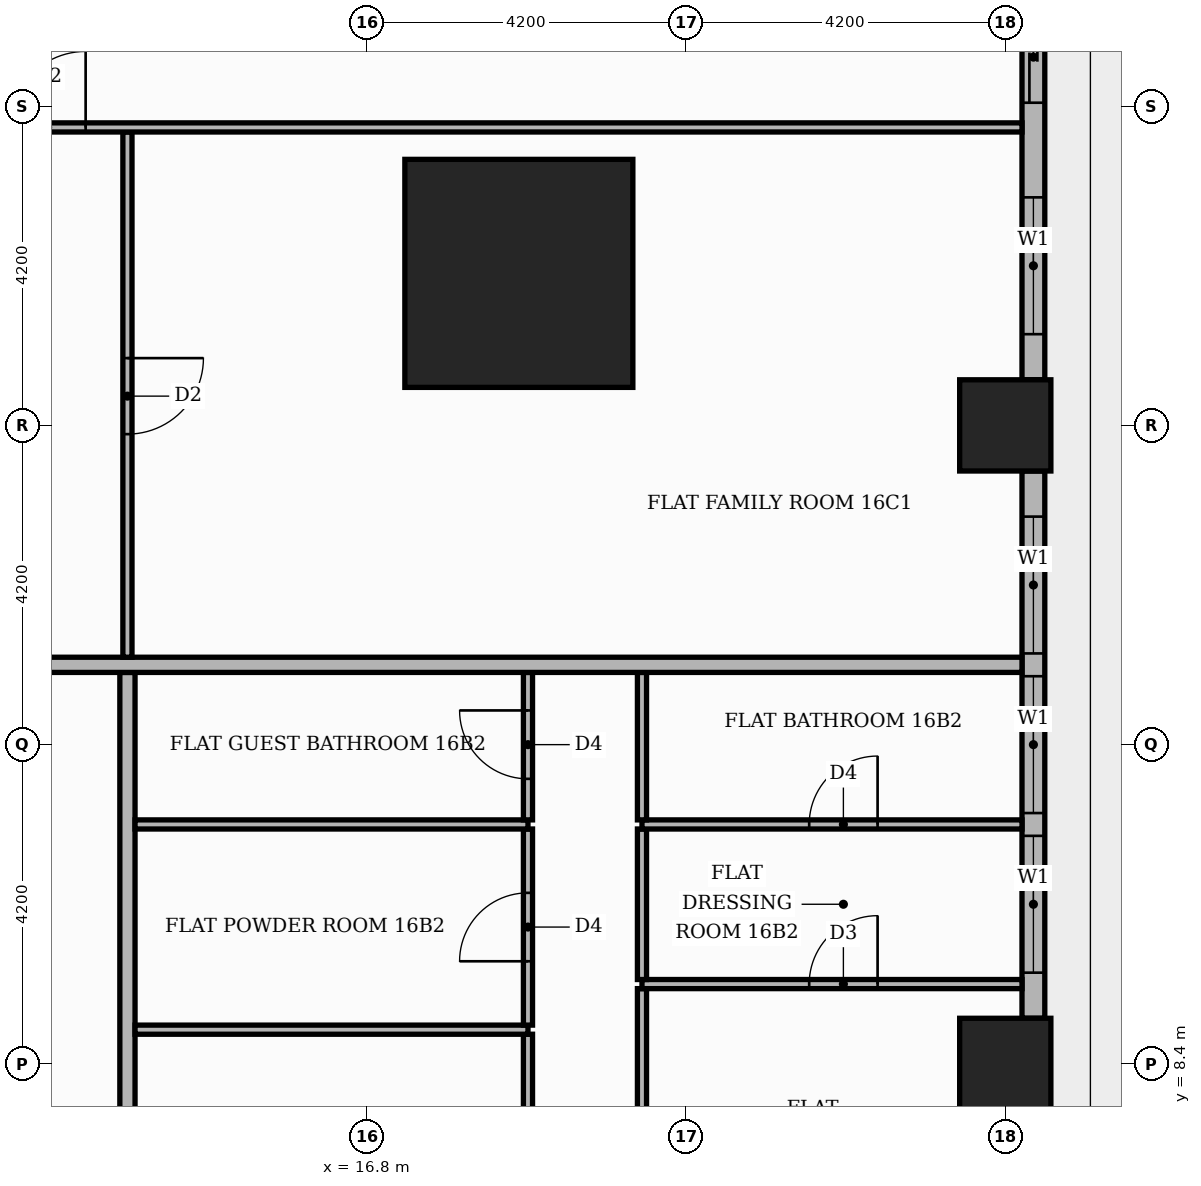
"""IFC4 building model, lengths in metres.
Left out: names, types, materials, properties, quantities, classifications, styles, units other than length and angle.
Written with IfcOpenShell. Run it as: python <this file> out.ifc"""

import sys

from ifc_helpers import new_model, si_unit, direction, frame, frame_2d, origin, origin_2d, place, context, subcontext, project, spatial, rectangle, extrude, element, fill, save


model = new_model("IFC4")
c1 = context("Model", 3, precision=1e-05, world=origin(), true_north=direction((0.0, 1.0)))
c2 = subcontext(c1, "Body", "Model", "MODEL_VIEW")
j1 = project(units=[si_unit("LENGTHUNIT", "METRE"), si_unit("PLANEANGLEUNIT", "RADIAN")], contexts=[c1])
p1 = place(None, origin())
s1 = spatial("IfcSite", under=j1, at=p1, CompositionType="ELEMENT")
p2 = place(p1, origin())
s2 = spatial("IfcBuilding", under=s1, at=p2, CompositionType="ELEMENT")
p3 = place(p2, frame((0.0, 0.0, 69.9)))
s3 = spatial("IfcBuildingStorey", under=s2, at=p3, CompositionType="ELEMENT", Elevation=69.9)
p4 = place(p3, frame((18.8, 18.8, 0.0), z_axis=(0.0, 0.0, 1.0), x_axis=(1.0, 0.0, 0.0)))
e1 = element("IfcColumn", 1, at=p4, inside=s3, PredefinedType="COLUMN", context=c2, shape_type="SweptSolid", body=[
    extrude(rectangle(XDim=3.0, YDim=3.0, at=origin_2d()), origin(), (0.0, 0.0, 1.0), 3.9),
])
for number, where, z_axis, x_axis in (
    (2, (25.2, 8.4, 0.0), (0.0, 0.0, 1.0), (1.0, 0.0, 0.0)),
    (3, (25.2, 16.8, 0.0), (0.0, 0.0, 1.0), (1.0, 0.0, 0.0)),
):
    element("IfcColumn", number, at=place(p3, frame(where, z_axis=z_axis, x_axis=x_axis)), inside=s3, PredefinedType="COLUMN", context=c2, shape_type="SweptSolid", body=[
        extrude(rectangle(XDim=1.2, YDim=1.2, at=origin_2d()), origin(), (0.0, 0.0, 1.0), 3.9),
    ])
p5 = place(p3, frame((25.57, 9.0, 0.0), z_axis=(0.0, 0.0, 1.0), x_axis=(0.0, 1.0, 0.0)))
e4 = element("IfcWall", 4, at=p5, inside=s3, PredefinedType="STANDARD", context=c2, shape_type="SweptSolid", body=[
    extrude(rectangle(XDim=7.2, YDim=0.3, at=frame_2d((3.6, 0.0))), origin(), (0.0, 0.0, 1.0), 3.4),
])
p6 = place(p5, frame((0.6, 0.0, 0.9)))
e5 = element("IfcOpeningElement", 5, at=p6, cuts=e4, PredefinedType="OPENING", context=c2, shape_type="SweptSolid", body=[
    extrude(rectangle(XDim=1.8, YDim=2.1, at=frame_2d((0.9, 1.05))), frame((0.0, 0.16, 0.0), z_axis=(0.0, -1.0, 0.0), x_axis=(1.0, 0.0, 0.0)), (0.0, 0.0, 1.0), 0.32),
])
p7 = place(p5, frame((2.7, 0.0, 0.9)))
e6 = element("IfcOpeningElement", 6, at=p7, cuts=e4, PredefinedType="OPENING", context=c2, shape_type="SweptSolid", body=[
    extrude(rectangle(XDim=1.8, YDim=2.1, at=frame_2d((0.9, 1.05))), frame((0.0, 0.16, 0.0), z_axis=(0.0, -1.0, 0.0), x_axis=(1.0, 0.0, 0.0)), (0.0, 0.0, 1.0), 0.32),
])
p8 = place(p5, frame((4.8, 0.0, 0.9)))
e7 = element("IfcOpeningElement", 7, at=p8, cuts=e4, PredefinedType="OPENING", context=c2, shape_type="SweptSolid", body=[
    extrude(rectangle(XDim=1.8, YDim=2.1, at=frame_2d((0.9, 1.05))), frame((0.0, 0.16, 0.0), z_axis=(0.0, -1.0, 0.0), x_axis=(1.0, 0.0, 0.0)), (0.0, 0.0, 1.0), 0.32),
])
p9 = place(p3, frame((25.57, 17.4, 0.0), z_axis=(0.0, 0.0, 1.0), x_axis=(0.0, 1.0, 0.0)))
e8 = element("IfcWall", 8, at=p9, inside=s3, PredefinedType="STANDARD", context=c2, shape_type="SweptSolid", body=[
    extrude(rectangle(XDim=5.32, YDim=0.3, at=frame_2d((2.66, 0.0))), origin(), (0.0, 0.0, 1.0), 3.4),
])
p10 = place(p9, frame((0.6, 0.0, 0.9)))
e9 = element("IfcOpeningElement", 9, at=p10, cuts=e8, PredefinedType="OPENING", context=c2, shape_type="SweptSolid", body=[
    extrude(rectangle(XDim=1.8, YDim=2.1, at=frame_2d((0.9, 1.05))), frame((0.0, 0.16, 0.0), z_axis=(0.0, -1.0, 0.0), x_axis=(1.0, 0.0, 0.0)), (0.0, 0.0, 1.0), 0.32),
])
p11 = place(p9, frame((3.645, 0.0, 0.0)))
e10 = element("IfcOpeningElement", 10, at=p11, cuts=e8, PredefinedType="OPENING", context=c2, shape_type="SweptSolid", body=[
    extrude(rectangle(XDim=1.2, YDim=2.4, at=frame_2d((0.6, 1.2))), frame((0.0, 0.16, 0.0), z_axis=(0.0, -1.0, 0.0), x_axis=(1.0, 0.0, 0.0)), (0.0, 0.0, 1.0), 0.32),
])
p12 = place(p3, frame((13.65, -5.15, 0.0), z_axis=(0.0, 0.0, 1.0), x_axis=(0.0, 1.0, 0.0)))
e11 = element("IfcWall", 11, at=p12, inside=s3, PredefinedType="PARTITIONING", context=c2, shape_type="SweptSolid", body=[
    extrude(rectangle(XDim=18.7, YDim=0.2, at=frame_2d((9.35, 0.0))), origin(), (0.0, 0.0, 1.0), 3.4),
])
p13 = place(p12, frame((5.65, 0.0, 0.0)))
e12 = element("IfcOpeningElement", 12, at=p13, cuts=e11, PredefinedType="OPENING", context=c2, shape_type="SweptSolid", body=[
    extrude(rectangle(XDim=1.1, YDim=2.4, at=frame_2d((0.55, 1.2))), frame((0.0, 0.11, 0.0), z_axis=(0.0, -1.0, 0.0), x_axis=(1.0, 0.0, 0.0)), (0.0, 0.0, 1.0), 0.22),
])
p14 = place(p3, frame((18.92, 3.21, 0.0), z_axis=(0.0, 0.0, 1.0), x_axis=(0.0, 1.0, 0.0)))
e13 = element("IfcWall", 13, at=p14, inside=s3, PredefinedType="PARTITIONING", context=c2, shape_type="SweptSolid", body=[
    extrude(rectangle(XDim=5.58, YDim=0.12, at=frame_2d((2.79, 0.0))), origin(), (0.0, 0.0, 1.0), 3.4),
])
p15 = place(p14, frame((2.34, 0.0, 0.0)))
e14 = element("IfcOpeningElement", 14, at=p15, cuts=e13, PredefinedType="OPENING", context=c2, shape_type="SweptSolid", body=[
    extrude(rectangle(XDim=0.9, YDim=2.1, at=frame_2d((0.45, 1.05))), frame((0.0, 0.07, 0.0), z_axis=(0.0, -1.0, 0.0), x_axis=(1.0, 0.0, 0.0)), (0.0, 0.0, 1.0), 0.14),
])
p16 = place(p3, frame((20.42, 5.31, 0.0), z_axis=(0.0, 0.0, 1.0), x_axis=(0.0, 1.0, 0.0)))
e15 = element("IfcWall", 15, at=p16, inside=s3, PredefinedType="PARTITIONING", context=c2, shape_type="SweptSolid", body=[
    extrude(rectangle(XDim=4.08, YDim=0.12, at=frame_2d((2.04, 0.0))), origin(), (0.0, 0.0, 1.0), 3.4),
])
p17 = place(p16, frame((1.59, 0.0, 0.0)))
e16 = element("IfcOpeningElement", 16, at=p17, cuts=e15, PredefinedType="OPENING", context=c2, shape_type="SweptSolid", body=[
    extrude(rectangle(XDim=0.9, YDim=2.1, at=frame_2d((0.45, 1.05))), frame((0.0, 0.07, 0.0), z_axis=(0.0, -1.0, 0.0), x_axis=(1.0, 0.0, 0.0)), (0.0, 0.0, 1.0), 0.14),
])
p18 = place(p3, frame((13.75, 8.85, 0.0), z_axis=(0.0, 0.0, 1.0), x_axis=(1.0, 0.0, 0.0)))
e17 = element("IfcWall", 17, at=p18, inside=s3, PredefinedType="PARTITIONING", context=c2, shape_type="SweptSolid", body=[
    extrude(rectangle(XDim=5.17, YDim=0.12, at=frame_2d((2.585, 0.0))), origin(), (0.0, 0.0, 1.0), 3.4),
])
p19 = place(p3, frame((18.92, 8.91, 0.0), z_axis=(0.0, 0.0, 1.0), x_axis=(0.0, 1.0, 0.0)))
e18 = element("IfcWall", 18, at=p19, inside=s3, PredefinedType="PARTITIONING", context=c2, shape_type="SweptSolid", body=[
    extrude(rectangle(XDim=2.58, YDim=0.12, at=frame_2d((1.29, 0.0))), origin(), (0.0, 0.0, 1.0), 3.4),
])
p20 = place(p19, frame((0.84, 0.0, 0.0)))
e19 = element("IfcOpeningElement", 19, at=p20, cuts=e18, PredefinedType="OPENING", context=c2, shape_type="SweptSolid", body=[
    extrude(rectangle(XDim=0.9, YDim=2.1, at=frame_2d((0.45, 1.05))), frame((0.0, 0.07, 0.0), z_axis=(0.0, -1.0, 0.0), x_axis=(1.0, 0.0, 0.0)), (0.0, 0.0, 1.0), 0.14),
])
p21 = place(p3, frame((20.42, 9.45, 0.0), z_axis=(0.0, 0.0, 1.0), x_axis=(1.0, 0.0, 0.0)))
e20 = element("IfcWall", 20, at=p21, inside=s3, PredefinedType="PARTITIONING", context=c2, shape_type="SweptSolid", body=[
    extrude(rectangle(XDim=5.0, YDim=0.12, at=frame_2d((2.5, 0.0))), origin(), (0.0, 0.0, 1.0), 3.4),
])
p22 = place(p21, frame((2.2, 0.0, 0.0)))
e21 = element("IfcOpeningElement", 21, at=p22, cuts=e20, PredefinedType="OPENING", context=c2, shape_type="SweptSolid", body=[
    extrude(rectangle(XDim=0.9, YDim=2.1, at=frame_2d((0.45, 1.05))), frame((0.0, 0.07, 0.0), z_axis=(0.0, -1.0, 0.0), x_axis=(1.0, 0.0, 0.0)), (0.0, 0.0, 1.0), 0.14),
])
p23 = place(p3, frame((20.42, 9.51, 0.0), z_axis=(0.0, 0.0, 1.0), x_axis=(0.0, 1.0, 0.0)))
e22 = element("IfcWall", 22, at=p23, inside=s3, PredefinedType="PARTITIONING", context=c2, shape_type="SweptSolid", body=[
    extrude(rectangle(XDim=1.98, YDim=0.12, at=frame_2d((0.99, 0.0))), origin(), (0.0, 0.0, 1.0), 3.4),
])
p24 = place(p3, frame((13.75, 11.55, 0.0), z_axis=(0.0, 0.0, 1.0), x_axis=(1.0, 0.0, 0.0)))
e23 = element("IfcWall", 23, at=p24, inside=s3, PredefinedType="PARTITIONING", context=c2, shape_type="SweptSolid", body=[
    extrude(rectangle(XDim=5.17, YDim=0.12, at=frame_2d((2.585, 0.0))), origin(), (0.0, 0.0, 1.0), 3.4),
])
p25 = place(p3, frame((20.42, 11.55, 0.0), z_axis=(0.0, 0.0, 1.0), x_axis=(1.0, 0.0, 0.0)))
e24 = element("IfcWall", 24, at=p25, inside=s3, PredefinedType="PARTITIONING", context=c2, shape_type="SweptSolid", body=[
    extrude(rectangle(XDim=5.0, YDim=0.12, at=frame_2d((2.5, 0.0))), origin(), (0.0, 0.0, 1.0), 3.4),
])
p26 = place(p25, frame((2.2, 0.0, 0.0)))
e25 = element("IfcOpeningElement", 25, at=p26, cuts=e24, PredefinedType="OPENING", context=c2, shape_type="SweptSolid", body=[
    extrude(rectangle(XDim=0.9, YDim=2.1, at=frame_2d((0.45, 1.05))), frame((0.0, 0.07, 0.0), z_axis=(0.0, -1.0, 0.0), x_axis=(1.0, 0.0, 0.0)), (0.0, 0.0, 1.0), 0.14),
])
p27 = place(p3, frame((18.92, 11.61, 0.0), z_axis=(0.0, 0.0, 1.0), x_axis=(0.0, 1.0, 0.0)))
e26 = element("IfcWall", 26, at=p27, inside=s3, PredefinedType="PARTITIONING", context=c2, shape_type="SweptSolid", body=[
    extrude(rectangle(XDim=1.94, YDim=0.12, at=frame_2d((0.97, 0.0))), origin(), (0.0, 0.0, 1.0), 3.4),
])
p28 = place(p27, frame((0.54, 0.0, 0.0)))
e27 = element("IfcOpeningElement", 27, at=p28, cuts=e26, PredefinedType="OPENING", context=c2, shape_type="SweptSolid", body=[
    extrude(rectangle(XDim=0.9, YDim=2.1, at=frame_2d((0.45, 1.05))), frame((0.0, 0.07, 0.0), z_axis=(0.0, -1.0, 0.0), x_axis=(1.0, 0.0, 0.0)), (0.0, 0.0, 1.0), 0.14),
])
p29 = place(p3, frame((20.42, 11.61, 0.0), z_axis=(0.0, 0.0, 1.0), x_axis=(0.0, 1.0, 0.0)))
e28 = element("IfcWall", 28, at=p29, inside=s3, PredefinedType="PARTITIONING", context=c2, shape_type="SweptSolid", body=[
    extrude(rectangle(XDim=1.94, YDim=0.12, at=frame_2d((0.97, 0.0))), origin(), (0.0, 0.0, 1.0), 3.4),
])
p30 = place(p3, frame((-13.65, 13.65, 0.0), z_axis=(0.0, 0.0, 1.0), x_axis=(1.0, 0.0, 0.0)))
e29 = element("IfcWall", 29, at=p30, inside=s3, PredefinedType="PARTITIONING", context=c2, shape_type="SweptSolid", body=[
    extrude(rectangle(XDim=39.07, YDim=0.2, at=frame_2d((19.535, 0.0))), origin(), (0.0, 0.0, 1.0), 3.4),
])
p31 = place(p30, frame((23.6, 0.0, 0.0)))
e30 = element("IfcOpeningElement", 30, at=p31, cuts=e29, PredefinedType="OPENING", context=c2, shape_type="SweptSolid", body=[
    extrude(rectangle(XDim=1.1, YDim=2.4, at=frame_2d((0.55, 1.2))), frame((0.0, 0.11, 0.0), z_axis=(0.0, -1.0, 0.0), x_axis=(1.0, 0.0, 0.0)), (0.0, 0.0, 1.0), 0.22),
])
p32 = place(p3, frame((13.65, 13.75, 0.0), z_axis=(0.0, 0.0, 1.0), x_axis=(0.0, 1.0, 0.0)))
e31 = element("IfcWall", 31, at=p32, inside=s3, PredefinedType="PARTITIONING", context=c2, shape_type="SweptSolid", body=[
    extrude(rectangle(XDim=6.91, YDim=0.12, at=frame_2d((3.455, 0.0))), origin(), (0.0, 0.0, 1.0), 3.4),
])
p33 = place(p32, frame((2.935, 0.0, 0.0)))
e32 = element("IfcOpeningElement", 32, at=p33, cuts=e31, PredefinedType="OPENING", context=c2, shape_type="SweptSolid", body=[
    extrude(rectangle(XDim=1.0, YDim=2.1, at=frame_2d((0.5, 1.05))), frame((0.0, 0.07, 0.0), z_axis=(0.0, -1.0, 0.0), x_axis=(1.0, 0.0, 0.0)), (0.0, 0.0, 1.0), 0.14),
])
p34 = place(p3, frame((-13.55, 20.72, 0.0), z_axis=(0.0, 0.0, 1.0), x_axis=(1.0, 0.0, 0.0)))
e33 = element("IfcWall", 33, at=p34, inside=s3, PredefinedType="PARTITIONING", context=c2, shape_type="SweptSolid", body=[
    extrude(rectangle(XDim=38.97, YDim=0.12, at=frame_2d((19.485, 0.0))), origin(), (0.0, 0.0, 1.0), 3.4),
])
p35 = place(p34, frame((25.65, 0.0, 0.0)))
e34 = element("IfcOpeningElement", 34, at=p35, cuts=e33, PredefinedType="OPENING", context=c2, shape_type="SweptSolid", body=[
    extrude(rectangle(XDim=1.0, YDim=2.1, at=frame_2d((0.5, 1.05))), frame((0.0, 0.07, 0.0), z_axis=(0.0, -1.0, 0.0), x_axis=(1.0, 0.0, 0.0)), (0.0, 0.0, 1.0), 0.14),
])
p36 = place(p34, frame((20.45, 0.0, 0.0)))
e35 = element("IfcOpeningElement", 35, at=p36, cuts=e33, PredefinedType="OPENING", context=c2, shape_type="SweptSolid", body=[
    extrude(rectangle(XDim=0.9, YDim=2.1, at=frame_2d((0.45, 1.05))), frame((0.0, 0.07, 0.0), z_axis=(0.0, -1.0, 0.0), x_axis=(1.0, 0.0, 0.0)), (0.0, 0.0, 1.0), 0.14),
])
p37 = place(p34, frame((9.95, 0.0, 0.0)))
e36 = element("IfcOpeningElement", 36, at=p37, cuts=e33, PredefinedType="OPENING", context=c2, shape_type="SweptSolid", body=[
    extrude(rectangle(XDim=0.9, YDim=2.1, at=frame_2d((0.45, 1.05))), frame((0.0, 0.07, 0.0), z_axis=(0.0, -1.0, 0.0), x_axis=(1.0, 0.0, 0.0)), (0.0, 0.0, 1.0), 0.14),
])
p38 = place(p34, frame((2.6, 0.0, 0.0)))
e37 = element("IfcOpeningElement", 37, at=p38, cuts=e33, PredefinedType="OPENING", context=c2, shape_type="SweptSolid", body=[
    extrude(rectangle(XDim=0.9, YDim=2.1, at=frame_2d((0.45, 1.05))), frame((0.0, 0.07, 0.0), z_axis=(0.0, -1.0, 0.0), x_axis=(1.0, 0.0, 0.0)), (0.0, 0.0, 1.0), 0.14),
])
p39 = place(p6, origin())
e38 = element("IfcWindow", 38, at=p39, inside=s3, PartitioningType="SINGLE_PANEL", PredefinedType="WINDOW", context=c2, shape_type="SweptSolid", body=[
    extrude(rectangle(XDim=1.8, YDim=2.1, at=frame_2d((0.9, 1.05))), frame((0.0, 0.03, 0.0), z_axis=(0.0, -1.0, 0.0), x_axis=(1.0, 0.0, 0.0)), (0.0, 0.0, 1.0), 0.06),
])
fill(e5, e38)
p40 = place(p7, origin())
e39 = element("IfcWindow", 39, at=p40, inside=s3, PartitioningType="SINGLE_PANEL", PredefinedType="WINDOW", context=c2, shape_type="SweptSolid", body=[
    extrude(rectangle(XDim=1.8, YDim=2.1, at=frame_2d((0.9, 1.05))), frame((0.0, 0.03, 0.0), z_axis=(0.0, -1.0, 0.0), x_axis=(1.0, 0.0, 0.0)), (0.0, 0.0, 1.0), 0.06),
])
fill(e6, e39)
p41 = place(p8, origin())
e40 = element("IfcWindow", 40, at=p41, inside=s3, PartitioningType="SINGLE_PANEL", PredefinedType="WINDOW", context=c2, shape_type="SweptSolid", body=[
    extrude(rectangle(XDim=1.8, YDim=2.1, at=frame_2d((0.9, 1.05))), frame((0.0, 0.03, 0.0), z_axis=(0.0, -1.0, 0.0), x_axis=(1.0, 0.0, 0.0)), (0.0, 0.0, 1.0), 0.06),
])
fill(e7, e40)
p42 = place(p10, origin())
e41 = element("IfcWindow", 41, at=p42, inside=s3, PartitioningType="SINGLE_PANEL", PredefinedType="WINDOW", context=c2, shape_type="SweptSolid", body=[
    extrude(rectangle(XDim=1.8, YDim=2.1, at=frame_2d((0.9, 1.05))), frame((0.0, 0.03, 0.0), z_axis=(0.0, -1.0, 0.0), x_axis=(1.0, 0.0, 0.0)), (0.0, 0.0, 1.0), 0.06),
])
fill(e9, e41)
p43 = place(p11, origin())
e42 = element("IfcDoor", 42, at=p43, inside=s3, OperationType="SLIDING_TO_RIGHT", PredefinedType="DOOR", context=c2, shape_type="SweptSolid", body=[
    extrude(rectangle(XDim=1.2, YDim=2.4, at=frame_2d((0.6, 1.2))), frame((0.0, 0.025, 0.0), z_axis=(0.0, -1.0, 0.0), x_axis=(1.0, 0.0, 0.0)), (0.0, 0.0, 1.0), 0.05),
])
fill(e10, e42)
p44 = place(p20, origin())
e43 = element("IfcDoor", 43, at=p44, inside=s3, OperationType="SINGLE_SWING_LEFT", PredefinedType="DOOR", context=c2, shape_type="SweptSolid", body=[
    extrude(rectangle(XDim=0.9, YDim=2.1, at=frame_2d((0.45, 1.05))), frame((0.0, 0.025, 0.0), z_axis=(0.0, -1.0, 0.0), x_axis=(1.0, 0.0, 0.0)), (0.0, 0.0, 1.0), 0.05),
])
fill(e19, e43)
p45 = place(p28, origin())
e44 = element("IfcDoor", 44, at=p45, inside=s3, OperationType="SINGLE_SWING_RIGHT", PredefinedType="DOOR", context=c2, shape_type="SweptSolid", body=[
    extrude(rectangle(XDim=0.9, YDim=2.1, at=frame_2d((0.45, 1.05))), frame((0.0, 0.025, 0.0), z_axis=(0.0, -1.0, 0.0), x_axis=(1.0, 0.0, 0.0)), (0.0, 0.0, 1.0), 0.05),
])
fill(e27, e44)
p46 = place(p22, origin())
e45 = element("IfcDoor", 45, at=p46, inside=s3, OperationType="SINGLE_SWING_RIGHT", PredefinedType="DOOR", context=c2, shape_type="SweptSolid", body=[
    extrude(rectangle(XDim=0.9, YDim=2.1, at=frame_2d((0.45, 1.05))), frame((0.0, 0.025, 0.0), z_axis=(0.0, -1.0, 0.0), x_axis=(1.0, 0.0, 0.0)), (0.0, 0.0, 1.0), 0.05),
])
fill(e21, e45)
p47 = place(p26, origin())
e46 = element("IfcDoor", 46, at=p47, inside=s3, OperationType="SINGLE_SWING_RIGHT", PredefinedType="DOOR", context=c2, shape_type="SweptSolid", body=[
    extrude(rectangle(XDim=0.9, YDim=2.1, at=frame_2d((0.45, 1.05))), frame((0.0, 0.025, 0.0), z_axis=(0.0, -1.0, 0.0), x_axis=(1.0, 0.0, 0.0)), (0.0, 0.0, 1.0), 0.05),
])
fill(e25, e46)
p48 = place(p33, frame((1.0, 0.0, 0.0), z_axis=(0.0, 0.0, 1.0), x_axis=(-1.0, 0.0, 0.0)))
e47 = element("IfcDoor", 47, at=p48, inside=s3, OperationType="SINGLE_SWING_RIGHT", PredefinedType="DOOR", context=c2, shape_type="SweptSolid", body=[
    extrude(rectangle(XDim=1.0, YDim=2.1, at=frame_2d((0.5, 1.05))), frame((0.0, 0.025, 0.0), z_axis=(0.0, -1.0, 0.0), x_axis=(1.0, 0.0, 0.0)), (0.0, 0.0, 1.0), 0.05),
])
fill(e32, e47)
p49 = place(p35, origin())
e48 = element("IfcDoor", 48, at=p49, inside=s3, OperationType="SINGLE_SWING_RIGHT", PredefinedType="DOOR", context=c2, shape_type="SweptSolid", body=[
    extrude(rectangle(XDim=1.0, YDim=2.1, at=frame_2d((0.5, 1.05))), frame((0.0, 0.025, 0.0), z_axis=(0.0, -1.0, 0.0), x_axis=(1.0, 0.0, 0.0)), (0.0, 0.0, 1.0), 0.05),
])
fill(e34, e48)
save(model, sys.argv[1])
